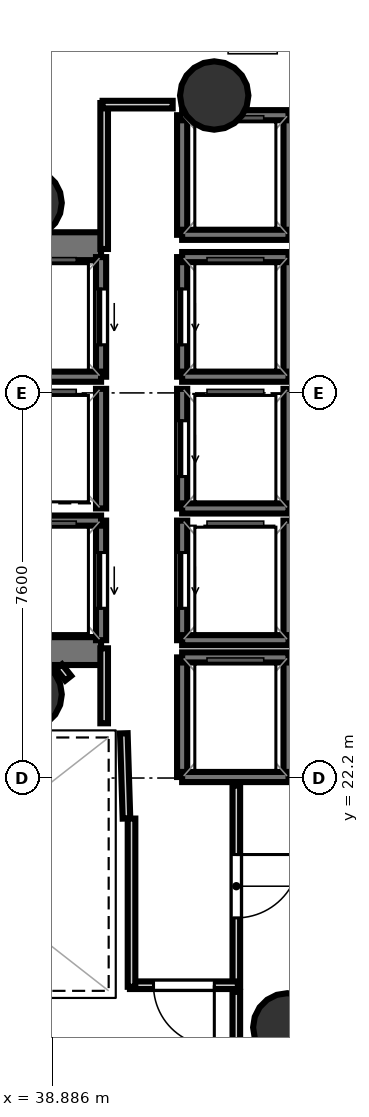
"""IFC4 building model, lengths in metres.
Left out: names, types, materials, properties, quantities, classifications, styles, units other than length and angle.
Written with IfcOpenShell. Run it as: python <this file> out.ifc"""

import sys

from ifc_helpers import new_model, si_unit, direction, frame, frame_2d, origin, origin_2d, place, context, subcontext, project, spatial, rectangle, hollow_circle, extrude, element, fill, save


model = new_model("IFC4")
c1 = context("Model", 3, precision=1e-05, world=origin(), true_north=direction((0.0, 1.0)))
c2 = subcontext(c1, "Body", "Model", "MODEL_VIEW")
j1 = project(units=[si_unit("LENGTHUNIT", "METRE"), si_unit("PLANEANGLEUNIT", "RADIAN")], contexts=[c1])
p1 = place(None, origin())
s1 = spatial("IfcSite", under=j1, at=p1, CompositionType="ELEMENT")
p2 = place(p1, origin())
s2 = spatial("IfcBuilding", under=s1, at=p2, CompositionType="ELEMENT")
p3 = place(p2, frame((0.0, 0.0, 162.4)))
s3 = spatial("IfcBuildingStorey", under=s2, at=p3, CompositionType="ELEMENT", Elevation=162.4)
p4 = place(p3, frame((29.23, 32.695, 0.0), z_axis=(0.0, 0.0, 1.0), x_axis=(1.0, 0.0, 0.0)))
e1 = element("IfcWall", 1, at=p4, inside=s3, PredefinedType="SHEAR", context=c2, shape_type="SweptSolid", body=[
    extrude(rectangle(XDim=10.62, YDim=0.55, at=frame_2d((5.31, 0.0))), origin(), (0.0, 0.0, 1.0), 3.52),
])
p5 = place(p4, frame((0.995, 0.0, 0.0)))
e2 = element("IfcOpeningElement", 2, at=p5, cuts=e1, PredefinedType="OPENING", context=c2, shape_type="SweptSolid", body=[
    extrude(rectangle(XDim=1.25, YDim=2.15, at=frame_2d((0.625, 1.075))), frame((0.0, 0.285, 0.0), z_axis=(0.0, -1.0, 0.0), x_axis=(1.0, 0.0, 0.0)), (0.0, 0.0, 1.0), 0.57),
])
p6 = place(p3, frame((29.23, 24.705, 0.0), z_axis=(0.0, 0.0, 1.0), x_axis=(1.0, 0.0, 0.0)))
e3 = element("IfcWall", 3, at=p6, inside=s3, PredefinedType="SHEAR", context=c2, shape_type="SweptSolid", body=[
    extrude(rectangle(XDim=10.62, YDim=0.55, at=frame_2d((5.31, 0.0))), origin(), (0.0, 0.0, 1.0), 3.52),
])
p7 = place(p6, frame((0.795, 0.0, 0.0)))
e4 = element("IfcOpeningElement", 4, at=p7, cuts=e3, PredefinedType="OPENING", context=c2, shape_type="SweptSolid", body=[
    extrude(rectangle(XDim=1.25, YDim=2.15, at=frame_2d((0.625, 1.075))), frame((0.0, 0.285, 0.0), z_axis=(0.0, -1.0, 0.0), x_axis=(1.0, 0.0, 0.0)), (0.0, 0.0, 1.0), 0.57),
])
for number, where, z_axis, x_axis in (
    (5, (38.4, 33.55, 0.0), (0.0, 0.0, 1.0), (1.0, 0.0, 0.0)),
    (6, (38.4, 23.85, 0.0), (0.0, 0.0, 1.0), (1.0, 0.0, 0.0)),
    (7, (42.083, 35.669, 0.0), (0.0, 0.0, 1.0), (1.0, 0.0, 0.0)),
    (8, (43.525, 17.279, 0.0), (0.0, 0.0, 1.0), (1.0, 0.0, 0.0)),
):
    element("IfcColumn", number, at=place(p3, frame(where, z_axis=z_axis, x_axis=x_axis)), inside=s3, PredefinedType="COLUMN", context=c2, shape_type="SweptSolid", body=[
        extrude(hollow_circle(Radius=0.675, WallThickness=0.032, at=origin_2d()), origin(), (0.0, 0.0, 1.0), 3.7),
    ])
p8 = place(p3, frame((39.85, 30.12, 0.0), z_axis=(0.0, 0.0, 1.0), x_axis=(0.0, 1.0, 0.0)))
e9 = element("IfcWall", 9, at=p8, inside=s3, PredefinedType="SOLIDWALL", context=c2, shape_type="SweptSolid", body=[
    extrude(rectangle(XDim=2.36, YDim=0.2, at=frame_2d((1.18, 0.0))), origin(), (0.0, 0.0, 1.0), 3.52),
])
p9 = place(p8, frame((0.63, 0.0, 0.0)))
e10 = element("IfcOpeningElement", 10, at=p9, cuts=e9, PredefinedType="OPENING", context=c2, shape_type="SweptSolid", body=[
    extrude(rectangle(XDim=1.1, YDim=2.15, at=frame_2d((0.55, 1.075))), frame((0.0, 0.11, 0.0), z_axis=(0.0, -1.0, 0.0), x_axis=(1.0, 0.0, 0.0)), (0.0, 0.0, 1.0), 0.22),
])
p10 = place(p3, frame((37.75, 30.12, 0.0), z_axis=(0.0, 0.0, 1.0), x_axis=(1.0, 0.0, 0.0)))
e11 = element("IfcWall", 11, at=p10, inside=s3, PredefinedType="SOLIDWALL", context=c2, shape_type="SweptSolid", body=[
    extrude(rectangle(XDim=2.1, YDim=0.2, at=frame_2d((1.05, 0.0))), origin(), (0.0, 0.0, 1.0), 3.52),
])
p11 = place(p3, frame((39.85, 24.92, 0.0), z_axis=(0.0, 0.0, 1.0), x_axis=(0.0, 1.0, 0.0)))
e12 = element("IfcWall", 12, at=p11, inside=s3, PredefinedType="SOLIDWALL", context=c2, shape_type="SweptSolid", body=[
    extrude(rectangle(XDim=2.36, YDim=0.2, at=frame_2d((1.18, 0.0))), origin(), (0.0, 0.0, 1.0), 3.52),
])
p12 = place(p11, frame((0.63, 0.0, 0.0)))
e13 = element("IfcOpeningElement", 13, at=p12, cuts=e12, PredefinedType="OPENING", context=c2, shape_type="SweptSolid", body=[
    extrude(rectangle(XDim=1.1, YDim=2.15, at=frame_2d((0.55, 1.075))), frame((0.0, 0.11, 0.0), z_axis=(0.0, -1.0, 0.0), x_axis=(1.0, 0.0, 0.0)), (0.0, 0.0, 1.0), 0.22),
])
p13 = place(p3, frame((37.75, 27.28, 0.0), z_axis=(0.0, 0.0, 1.0), x_axis=(1.0, 0.0, 0.0)))
e14 = element("IfcWall", 14, at=p13, inside=s3, PredefinedType="SOLIDWALL", context=c2, shape_type="SweptSolid", body=[
    extrude(rectangle(XDim=2.1, YDim=0.2, at=frame_2d((1.05, 0.0))), origin(), (0.0, 0.0, 1.0), 3.52),
])
p14 = place(p3, frame((43.55, 30.12, 0.0), z_axis=(0.0, 0.0, 1.0), x_axis=(0.0, 1.0, 0.0)))
e15 = element("IfcWall", 15, at=p14, inside=s3, PredefinedType="SOLIDWALL", context=c2, shape_type="SweptSolid", body=[
    extrude(rectangle(XDim=2.36, YDim=0.2, at=frame_2d((1.18, 0.0))), origin(), (0.0, 0.0, 1.0), 3.52),
])
p15 = place(p3, frame((41.45, 30.12, 0.0), z_axis=(0.0, 0.0, 1.0), x_axis=(0.0, 1.0, 0.0)))
e16 = element("IfcWall", 16, at=p15, inside=s3, PredefinedType="SOLIDWALL", context=c2, shape_type="SweptSolid", body=[
    extrude(rectangle(XDim=2.36, YDim=0.2, at=frame_2d((1.18, 0.0))), origin(), (0.0, 0.0, 1.0), 3.52),
])
p16 = place(p15, frame((0.63, 0.0, 0.0)))
e17 = element("IfcOpeningElement", 17, at=p16, cuts=e16, PredefinedType="OPENING", context=c2, shape_type="SweptSolid", body=[
    extrude(rectangle(XDim=1.1, YDim=2.15, at=frame_2d((0.55, 1.075))), frame((0.0, 0.11, 0.0), z_axis=(0.0, -1.0, 0.0), x_axis=(1.0, 0.0, 0.0)), (0.0, 0.0, 1.0), 0.22),
])
for number, where, z_axis, x_axis in (
    (18, (41.45, 32.48, 0.0), (0.0, 0.0, 1.0), (1.0, 0.0, 0.0)),
    (19, (41.45, 30.12, 0.0), (0.0, 0.0, 1.0), (1.0, 0.0, 0.0)),
):
    element("IfcWall", number, at=place(p3, frame(where, z_axis=z_axis, x_axis=x_axis)), inside=s3, PredefinedType="SOLIDWALL", context=c2, shape_type="SweptSolid", body=[
        extrude(rectangle(XDim=2.1, YDim=0.2, at=frame_2d((1.05, 0.0))), origin(), (0.0, 0.0, 1.0), 3.52),
    ])
p17 = place(p3, frame((43.55, 27.52, 0.0), z_axis=(0.0, 0.0, 1.0), x_axis=(0.0, 1.0, 0.0)))
e20 = element("IfcWall", 20, at=p17, inside=s3, PredefinedType="SOLIDWALL", context=c2, shape_type="SweptSolid", body=[
    extrude(rectangle(XDim=2.36, YDim=0.2, at=frame_2d((1.18, 0.0))), origin(), (0.0, 0.0, 1.0), 3.52),
])
p18 = place(p3, frame((41.45, 27.52, 0.0), z_axis=(0.0, 0.0, 1.0), x_axis=(0.0, 1.0, 0.0)))
e21 = element("IfcWall", 21, at=p18, inside=s3, PredefinedType="SOLIDWALL", context=c2, shape_type="SweptSolid", body=[
    extrude(rectangle(XDim=2.36, YDim=0.2, at=frame_2d((1.18, 0.0))), origin(), (0.0, 0.0, 1.0), 3.52),
])
p19 = place(p18, frame((0.63, 0.0, 0.0)))
e22 = element("IfcOpeningElement", 22, at=p19, cuts=e21, PredefinedType="OPENING", context=c2, shape_type="SweptSolid", body=[
    extrude(rectangle(XDim=1.1, YDim=2.15, at=frame_2d((0.55, 1.075))), frame((0.0, 0.11, 0.0), z_axis=(0.0, -1.0, 0.0), x_axis=(1.0, 0.0, 0.0)), (0.0, 0.0, 1.0), 0.22),
])
p20 = place(p3, frame((41.45, 27.52, 0.0), z_axis=(0.0, 0.0, 1.0), x_axis=(1.0, 0.0, 0.0)))
e23 = element("IfcWall", 23, at=p20, inside=s3, PredefinedType="SOLIDWALL", context=c2, shape_type="SweptSolid", body=[
    extrude(rectangle(XDim=2.1, YDim=0.2, at=frame_2d((1.05, 0.0))), origin(), (0.0, 0.0, 1.0), 3.52),
])
p21 = place(p3, frame((43.55, 24.92, 0.0), z_axis=(0.0, 0.0, 1.0), x_axis=(0.0, 1.0, 0.0)))
e24 = element("IfcWall", 24, at=p21, inside=s3, PredefinedType="SOLIDWALL", context=c2, shape_type="SweptSolid", body=[
    extrude(rectangle(XDim=2.36, YDim=0.2, at=frame_2d((1.18, 0.0))), origin(), (0.0, 0.0, 1.0), 3.52),
])
p22 = place(p3, frame((41.45, 24.92, 0.0), z_axis=(0.0, 0.0, 1.0), x_axis=(0.0, 1.0, 0.0)))
e25 = element("IfcWall", 25, at=p22, inside=s3, PredefinedType="SOLIDWALL", context=c2, shape_type="SweptSolid", body=[
    extrude(rectangle(XDim=2.36, YDim=0.2, at=frame_2d((1.18, 0.0))), origin(), (0.0, 0.0, 1.0), 3.52),
])
p23 = place(p22, frame((0.63, 0.0, 0.0)))
e26 = element("IfcOpeningElement", 26, at=p23, cuts=e25, PredefinedType="OPENING", context=c2, shape_type="SweptSolid", body=[
    extrude(rectangle(XDim=1.1, YDim=2.15, at=frame_2d((0.55, 1.075))), frame((0.0, 0.11, 0.0), z_axis=(0.0, -1.0, 0.0), x_axis=(1.0, 0.0, 0.0)), (0.0, 0.0, 1.0), 0.22),
])
p24 = place(p3, frame((41.45, 24.92, 0.0), z_axis=(0.0, 0.0, 1.0), x_axis=(1.0, 0.0, 0.0)))
e27 = element("IfcWall", 27, at=p24, inside=s3, PredefinedType="SOLIDWALL", context=c2, shape_type="SweptSolid", body=[
    extrude(rectangle(XDim=2.1, YDim=0.2, at=frame_2d((1.05, 0.0))), origin(), (0.0, 0.0, 1.0), 3.52),
])
p25 = place(p3, frame((39.85, 27.52, 0.0), z_axis=(0.0, 0.0, 1.0), x_axis=(0.0, 1.0, 0.0)))
e28 = element("IfcWall", 28, at=p25, inside=s3, PredefinedType="SOLIDWALL", context=c2, shape_type="SweptSolid", body=[
    extrude(rectangle(XDim=2.36, YDim=0.2, at=frame_2d((1.18, 0.0))), origin(), (0.0, 0.0, 1.0), 3.52),
])
for number, where, z_axis, x_axis in (
    (29, (43.55, 22.22, 0.0), (0.0, 0.0, 1.0), (0.0, 1.0, 0.0)),
    (30, (41.45, 22.22, 0.0), (0.0, 0.0, 1.0), (0.0, 1.0, 0.0)),
):
    element("IfcWall", number, at=place(p3, frame(where, z_axis=z_axis, x_axis=x_axis)), inside=s3, PredefinedType="SOLIDWALL", context=c2, shape_type="SweptSolid", body=[
        extrude(rectangle(XDim=2.36, YDim=0.2, at=frame_2d((1.18, 0.0))), origin(), (0.0, 0.0, 1.0), 3.52),
    ])
for number, where, z_axis, x_axis in (
    (31, (41.45, 24.58, 0.0), (0.0, 0.0, 1.0), (1.0, 0.0, 0.0)),
    (32, (41.45, 22.22, 0.0), (0.0, 0.0, 1.0), (1.0, 0.0, 0.0)),
):
    element("IfcWall", number, at=place(p3, frame(where, z_axis=z_axis, x_axis=x_axis)), inside=s3, PredefinedType="SOLIDWALL", context=c2, shape_type="SweptSolid", body=[
        extrude(rectangle(XDim=2.1, YDim=0.2, at=frame_2d((1.05, 0.0))), origin(), (0.0, 0.0, 1.0), 3.52),
    ])
for number, where, z_axis, x_axis in (
    (33, (43.55, 32.92, 0.0), (0.0, 0.0, 1.0), (0.0, 1.0, 0.0)),
    (34, (41.45, 32.92, 0.0), (0.0, 0.0, 1.0), (0.0, 1.0, 0.0)),
):
    element("IfcWall", number, at=place(p3, frame(where, z_axis=z_axis, x_axis=x_axis)), inside=s3, PredefinedType="SOLIDWALL", context=c2, shape_type="SweptSolid", body=[
        extrude(rectangle(XDim=2.36, YDim=0.2, at=frame_2d((1.18, 0.0))), origin(), (0.0, 0.0, 1.0), 3.52),
    ])
for number, where, z_axis, x_axis in (
    (35, (41.45, 35.28, 0.0), (0.0, 0.0, 1.0), (1.0, 0.0, 0.0)),
    (36, (41.45, 32.92, 0.0), (0.0, 0.0, 1.0), (1.0, 0.0, 0.0)),
):
    element("IfcWall", number, at=place(p3, frame(where, z_axis=z_axis, x_axis=x_axis)), inside=s3, PredefinedType="SOLIDWALL", context=c2, shape_type="SweptSolid", body=[
        extrude(rectangle(XDim=2.1, YDim=0.2, at=frame_2d((1.05, 0.0))), origin(), (0.0, 0.0, 1.0), 3.52),
    ])
p26 = place(p3, frame((40.351, 21.401, 0.0), z_axis=(0.0, 0.0, 1.0), x_axis=(-0.031058045979, 0.999517582527, 0.0)))
e37 = element("IfcWall", 37, at=p26, inside=s3, PredefinedType="PARTITIONING", context=c2, shape_type="SweptSolid", body=[
    extrude(rectangle(XDim=1.682, YDim=0.15, at=frame_2d((0.841, 0.0))), origin(), (0.0, 0.0, 1.0), 2.84),
])
p27 = place(p3, frame((39.911, 23.28, 0.0), z_axis=(0.0, 0.0, 1.0), x_axis=(0.0, 1.0, 0.0)))
e38 = element("IfcWall", 38, at=p27, inside=s3, PredefinedType="PARTITIONING", context=c2, shape_type="SweptSolid", body=[
    extrude(rectangle(XDim=1.48, YDim=0.15, at=frame_2d((0.74, 0.0))), origin(), (0.0, 0.0, 1.0), 2.84),
])
p28 = place(p3, frame((39.911, 32.64, 0.0), z_axis=(0.0, 0.0, 1.0), x_axis=(0.0, 1.0, 0.0)))
e39 = element("IfcWall", 39, at=p28, inside=s3, PredefinedType="PARTITIONING", context=c2, shape_type="SweptSolid", body=[
    extrude(rectangle(XDim=2.88, YDim=0.15, at=frame_2d((1.44, 0.0))), origin(), (0.0, 0.0, 1.0), 2.84),
])
p29 = place(p3, frame((39.88, 35.489, 0.0), z_axis=(0.0, 0.0, 1.0), x_axis=(1.0, 0.0, 0.0)))
e40 = element("IfcWall", 40, at=p29, inside=s3, PredefinedType="PARTITIONING", context=c2, shape_type="SweptSolid", body=[
    extrude(rectangle(XDim=1.383, YDim=0.15, at=frame_2d((0.691, 0.0))), origin(), (0.0, 0.0, 1.0), 2.84),
])
p30 = place(p3, frame((42.519, 22.05, 0.0), z_axis=(0.0, 0.0, 1.0), x_axis=(0.0, -1.0, 0.0)))
e41 = element("IfcWall", 41, at=p30, inside=s3, PredefinedType="PARTITIONING", context=c2, shape_type="SweptSolid", body=[
    extrude(rectangle(XDim=3.97, YDim=0.15, at=frame_2d((1.985, 0.0))), origin(), (0.0, 0.0, 1.0), 2.84),
])
p31 = place(p30, frame((1.36, 0.0, 0.0)))
e42 = element("IfcOpeningElement", 42, at=p31, cuts=e41, PredefinedType="OPENING", context=c2, shape_type="SweptSolid", body=[
    extrude(rectangle(XDim=1.25, YDim=2.2, at=frame_2d((0.625, 1.1))), frame((0.0, 0.085, 0.0), z_axis=(0.0, -1.0, 0.0), x_axis=(1.0, 0.0, 0.0)), (0.0, 0.0, 1.0), 0.17),
])
p32 = place(p3, frame((42.55, 18.111, 0.0), z_axis=(0.0, 0.0, 1.0), x_axis=(-1.0, 0.0, 0.0)))
e43 = element("IfcWall", 43, at=p32, inside=s3, PredefinedType="PARTITIONING", context=c2, shape_type="SweptSolid", body=[
    extrude(rectangle(XDim=2.13, YDim=0.15, at=frame_2d((1.065, 0.0))), origin(), (0.0, 0.0, 1.0), 2.84),
])
p33 = place(p32, frame((0.465, 0.0, 0.0)))
e44 = element("IfcOpeningElement", 44, at=p33, cuts=e43, PredefinedType="OPENING", context=c2, shape_type="SweptSolid", body=[
    extrude(rectangle(XDim=1.2, YDim=2.15, at=frame_2d((0.6, 1.075))), frame((0.0, 0.085, 0.0), z_axis=(0.0, -1.0, 0.0), x_axis=(1.0, 0.0, 0.0)), (0.0, 0.0, 1.0), 0.17),
])
p34 = place(p3, frame((40.451, 18.08, 0.0), z_axis=(0.0, 0.0, 1.0), x_axis=(0.0, 1.0, 0.0)))
e45 = element("IfcWall", 45, at=p34, inside=s3, PredefinedType="PARTITIONING", context=c2, shape_type="SweptSolid", body=[
    extrude(rectangle(XDim=3.32, YDim=0.15, at=frame_2d((1.66, 0.0))), origin(), (0.0, 0.0, 1.0), 2.84),
])
p35 = place(p3, frame((39.202, 24.169, 0.0), z_axis=(0.0, 0.0, 1.0), x_axis=(-0.622453876994, 0.782656483405, 0.0)))
e46 = element("IfcWall", 46, at=p35, inside=s3, PredefinedType="PARTITIONING", context=c2, shape_type="SweptSolid", body=[
    extrude(rectangle(XDim=0.292, YDim=0.15, at=frame_2d((0.146, 0.0))), origin(), (0.0, 0.0, 1.0), 2.84),
])
p36 = place(p3, frame((42.519, 17.98, 0.0), z_axis=(0.0, 0.0, 1.0), x_axis=(0.0, -1.0, 0.0)))
e47 = element("IfcWall", 47, at=p36, inside=s3, PredefinedType="PARTITIONING", context=c2, shape_type="SweptSolid", body=[
    extrude(rectangle(XDim=3.201, YDim=0.15, at=frame_2d((1.601, 0.0))), origin(), (0.0, 0.0, 1.0), 2.84),
])
p37 = place(p9, origin())
e48 = element("IfcDoor", 48, at=p37, inside=s3, OperationType="SLIDING_TO_LEFT", PredefinedType="DOOR", context=c2, shape_type="SweptSolid", body=[
    extrude(rectangle(XDim=1.1, YDim=2.15, at=frame_2d((0.55, 1.075))), frame((0.0, 0.025, 0.0), z_axis=(0.0, -1.0, 0.0), x_axis=(1.0, 0.0, 0.0)), (0.0, 0.0, 1.0), 0.05),
])
fill(e10, e48)
p38 = place(p12, origin())
e49 = element("IfcDoor", 49, at=p38, inside=s3, OperationType="SLIDING_TO_LEFT", PredefinedType="DOOR", context=c2, shape_type="SweptSolid", body=[
    extrude(rectangle(XDim=1.1, YDim=2.15, at=frame_2d((0.55, 1.075))), frame((0.0, 0.025, 0.0), z_axis=(0.0, -1.0, 0.0), x_axis=(1.0, 0.0, 0.0)), (0.0, 0.0, 1.0), 0.05),
])
fill(e13, e49)
p39 = place(p16, origin())
e50 = element("IfcDoor", 50, at=p39, inside=s3, OperationType="SLIDING_TO_LEFT", PredefinedType="DOOR", context=c2, shape_type="SweptSolid", body=[
    extrude(rectangle(XDim=1.1, YDim=2.15, at=frame_2d((0.55, 1.075))), frame((0.0, 0.025, 0.0), z_axis=(0.0, -1.0, 0.0), x_axis=(1.0, 0.0, 0.0)), (0.0, 0.0, 1.0), 0.05),
])
fill(e17, e50)
p40 = place(p19, origin())
e51 = element("IfcDoor", 51, at=p40, inside=s3, OperationType="SLIDING_TO_LEFT", PredefinedType="DOOR", context=c2, shape_type="SweptSolid", body=[
    extrude(rectangle(XDim=1.1, YDim=2.15, at=frame_2d((0.55, 1.075))), frame((0.0, 0.025, 0.0), z_axis=(0.0, -1.0, 0.0), x_axis=(1.0, 0.0, 0.0)), (0.0, 0.0, 1.0), 0.05),
])
fill(e22, e51)
p41 = place(p23, origin())
e52 = element("IfcDoor", 52, at=p41, inside=s3, OperationType="SLIDING_TO_LEFT", PredefinedType="DOOR", context=c2, shape_type="SweptSolid", body=[
    extrude(rectangle(XDim=1.1, YDim=2.15, at=frame_2d((0.55, 1.075))), frame((0.0, 0.025, 0.0), z_axis=(0.0, -1.0, 0.0), x_axis=(1.0, 0.0, 0.0)), (0.0, 0.0, 1.0), 0.05),
])
fill(e26, e52)
p42 = place(p33, origin())
e53 = element("IfcDoor", 53, at=p42, inside=s3, OperationType="SINGLE_SWING_LEFT", PredefinedType="DOOR", context=c2, shape_type="SweptSolid", body=[
    extrude(rectangle(XDim=1.2, YDim=2.15, at=frame_2d((0.6, 1.075))), frame((0.0, 0.025, 0.0), z_axis=(0.0, -1.0, 0.0), x_axis=(1.0, 0.0, 0.0)), (0.0, 0.0, 1.0), 0.05),
])
fill(e44, e53)
p43 = place(p31, origin())
e54 = element("IfcDoor", 54, at=p43, inside=s3, OperationType="SINGLE_SWING_LEFT", PredefinedType="DOOR", context=c2, shape_type="SweptSolid", body=[
    extrude(rectangle(XDim=1.25, YDim=2.2, at=frame_2d((0.625, 1.1))), frame((0.0, 0.025, 0.0), z_axis=(0.0, -1.0, 0.0), x_axis=(1.0, 0.0, 0.0)), (0.0, 0.0, 1.0), 0.05),
])
fill(e42, e54)
save(model, sys.argv[1])
